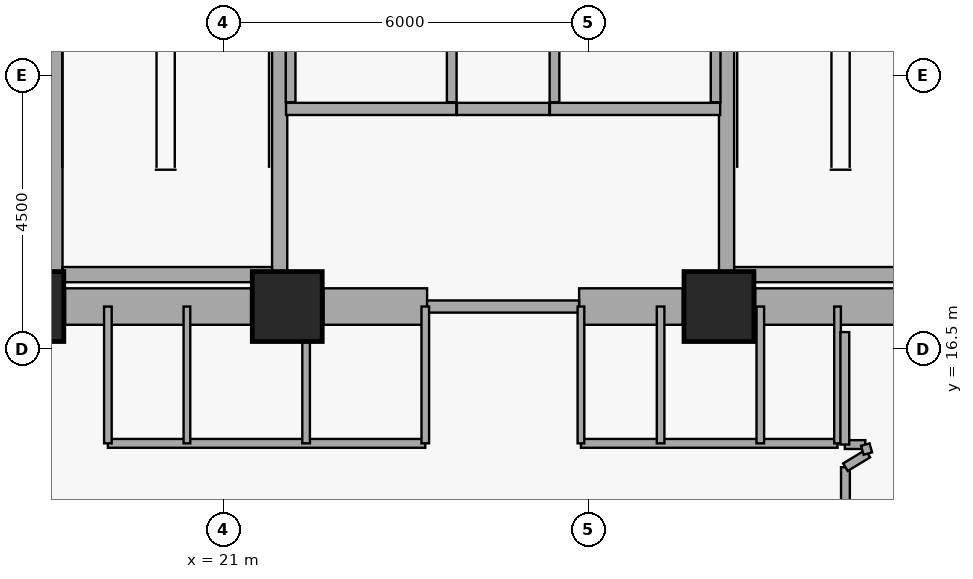
"""IFC4 building model, lengths in metres.
Left out: names, types, materials, properties, quantities, classifications, styles, units other than length and angle.
Written with IfcOpenShell. Run it as: python <this file> out.ifc"""

import sys

from ifc_helpers import new_model, si_unit, direction, frame, frame_2d, origin, origin_2d, place, context, subcontext, project, spatial, rectangle, extrude, element, fill, save


model = new_model("IFC4")
c1 = context("Model", 3, precision=1e-05, world=origin(), true_north=direction((0.0, 1.0)))
c2 = subcontext(c1, "Body", "Model", "MODEL_VIEW")
j1 = project(units=[si_unit("LENGTHUNIT", "METRE"), si_unit("PLANEANGLEUNIT", "RADIAN")], contexts=[c1])
p1 = place(None, origin())
s1 = spatial("IfcSite", under=j1, at=p1, CompositionType="ELEMENT")
p2 = place(p1, origin())
s2 = spatial("IfcBuilding", under=s1, at=p2, CompositionType="ELEMENT")
p3 = place(p2, frame((0.0, 0.0, 68.52)))
s3 = spatial("IfcBuildingStorey", under=s2, at=p3, CompositionType="ELEMENT", Elevation=68.52)
for number, where, z_axis, x_axis in (
    (1, (17.8, 17.2, 0.0), (0.0, 0.0, 1.0), (1.0, 0.0, 0.0)),
    (2, (22.05, 17.2, 0.0), (0.0, 0.0, 1.0), (1.0, 0.0, 0.0)),
    (3, (29.15, 17.2, 0.0), (0.0, 0.0, 1.0), (1.0, 0.0, 0.0)),
):
    element("IfcColumn", number, at=place(p3, frame(where, z_axis=z_axis, x_axis=x_axis)), inside=s3, PredefinedType="COLUMN", context=c2, shape_type="SweptSolid", body=[
        extrude(rectangle(XDim=1.15, YDim=1.15, at=origin_2d()), origin(), (0.0, 0.0, 1.0), 3.72),
    ])
p4 = place(p3, frame((18.395, 17.2, 0.0), z_axis=(0.0, 0.0, 1.0), x_axis=(1.0, 0.0, 0.0)))
e4 = element("IfcWall", 4, at=p4, inside=s3, PredefinedType="SHEAR", context=c2, shape_type="SweptSolid", body=[
    extrude(rectangle(XDim=3.06, YDim=0.6, at=frame_2d((1.53, 0.0))), origin(), (0.0, 0.0, 1.0), 3.47),
])
p5 = place(p3, frame((22.645, 17.2, 0.0), z_axis=(0.0, 0.0, 1.0), x_axis=(1.0, 0.0, 0.0)))
e5 = element("IfcWall", 5, at=p5, inside=s3, PredefinedType="SHEAR", context=c2, shape_type="SweptSolid", body=[
    extrude(rectangle(XDim=1.705, YDim=0.6, at=frame_2d((0.853, 0.0))), origin(), (0.0, 0.0, 1.0), 3.47),
])
p6 = place(p3, frame((26.85, 17.2, 0.0), z_axis=(0.0, 0.0, 1.0), x_axis=(1.0, 0.0, 0.0)))
e6 = element("IfcWall", 6, at=p6, inside=s3, PredefinedType="SHEAR", context=c2, shape_type="SweptSolid", body=[
    extrude(rectangle(XDim=1.705, YDim=0.6, at=frame_2d((0.853, 0.0))), origin(), (0.0, 0.0, 1.0), 3.47),
])
p7 = place(p3, frame((29.745, 17.2, 0.0), z_axis=(0.0, 0.0, 1.0), x_axis=(1.0, 0.0, 0.0)))
e7 = element("IfcWall", 7, at=p7, inside=s3, PredefinedType="SHEAR", context=c2, shape_type="SweptSolid", body=[
    extrude(rectangle(XDim=3.06, YDim=0.6, at=frame_2d((1.53, 0.0))), origin(), (0.0, 0.0, 1.0), 3.47),
])
p8 = place(p3, frame((18.229, 17.6, 0.0), z_axis=(0.0, 0.0, 1.0), x_axis=(0.0, 1.0, 0.0)))
e8 = element("IfcWall", 8, at=p8, inside=s3, PredefinedType="SHEAR", context=c2, shape_type="SweptSolid", body=[
    extrude(rectangle(XDim=8.8, YDim=0.25, at=frame_2d((4.4, 0.0))), origin(), (0.0, 0.0, 1.0), 3.47),
])
p9 = place(p3, frame((21.925, 17.6, 0.0), z_axis=(0.0, 0.0, 1.0), x_axis=(0.0, 1.0, 0.0)))
e9 = element("IfcWall", 9, at=p9, inside=s3, PredefinedType="SHEAR", context=c2, shape_type="SweptSolid", body=[
    extrude(rectangle(XDim=8.8, YDim=0.25, at=frame_2d((4.4, 0.0))), origin(), (0.0, 0.0, 1.0), 3.47),
])
p10 = place(p9, frame((0.35, 0.0, 0.0)))
e10 = element("IfcOpeningElement", 10, at=p10, cuts=e9, PredefinedType="OPENING", context=c2, shape_type="SweptSolid", body=[
    extrude(rectangle(XDim=1.05, YDim=2.08, at=frame_2d((0.525, 1.04))), frame((0.0, 0.135, 0.0), z_axis=(0.0, -1.0, 0.0), x_axis=(1.0, 0.0, 0.0)), (0.0, 0.0, 1.0), 0.27),
])
p11 = place(p3, frame((18.354, 17.725, 0.0), z_axis=(0.0, 0.0, 1.0), x_axis=(1.0, 0.0, 0.0)))
e11 = element("IfcWall", 11, at=p11, inside=s3, PredefinedType="SHEAR", context=c2, shape_type="SweptSolid", body=[
    extrude(rectangle(XDim=3.446, YDim=0.25, at=frame_2d((1.723, 0.0))), origin(), (0.0, 0.0, 1.0), 3.47),
])
p12 = place(p3, frame((29.275, 17.6, 0.0), z_axis=(0.0, 0.0, 1.0), x_axis=(0.0, 1.0, 0.0)))
e12 = element("IfcWall", 12, at=p12, inside=s3, PredefinedType="SHEAR", context=c2, shape_type="SweptSolid", body=[
    extrude(rectangle(XDim=8.8, YDim=0.25, at=frame_2d((4.4, 0.0))), origin(), (0.0, 0.0, 1.0), 3.47),
])
p13 = place(p12, frame((0.35, 0.0, 0.0)))
e13 = element("IfcOpeningElement", 13, at=p13, cuts=e12, PredefinedType="OPENING", context=c2, shape_type="SweptSolid", body=[
    extrude(rectangle(XDim=1.05, YDim=2.08, at=frame_2d((0.525, 1.04))), frame((0.0, 0.135, 0.0), z_axis=(0.0, -1.0, 0.0), x_axis=(1.0, 0.0, 0.0)), (0.0, 0.0, 1.0), 0.27),
])
p14 = place(p3, frame((29.4, 17.725, 0.0), z_axis=(0.0, 0.0, 1.0), x_axis=(1.0, 0.0, 0.0)))
e14 = element("IfcWall", 14, at=p14, inside=s3, PredefinedType="SHEAR", context=c2, shape_type="SweptSolid", body=[
    extrude(rectangle(XDim=3.446, YDim=0.25, at=frame_2d((1.723, 0.0))), origin(), (0.0, 0.0, 1.0), 3.47),
])
p15 = place(p3, frame((24.35, 17.2, 0.0), z_axis=(0.0, 0.0, 1.0), x_axis=(1.0, 0.0, 0.0)))
e15 = element("IfcWall", 15, at=p15, inside=s3, PredefinedType="PARTITIONING", context=c2, shape_type="SweptSolid", body=[
    extrude(rectangle(XDim=2.5, YDim=0.2, at=frame_2d((1.25, 0.0))), origin(), (0.0, 0.0, 1.0), 2.6),
])
p16 = place(p15, frame((0.68, 0.0, 0.0)))
e16 = element("IfcOpeningElement", 16, at=p16, cuts=e15, PredefinedType="OPENING", context=c2, shape_type="SweptSolid", body=[
    extrude(rectangle(XDim=1.15, YDim=2.08, at=frame_2d((0.575, 1.04))), frame((0.0, 0.11, 0.0), z_axis=(0.0, -1.0, 0.0), x_axis=(1.0, 0.0, 0.0)), (0.0, 0.0, 1.0), 0.22),
])
p17 = place(p3, frame((24.84, 20.45, 0.0), z_axis=(0.0, 0.0, 1.0), x_axis=(1.0, 0.0, 0.0)))
e17 = element("IfcWall", 17, at=p17, inside=s3, PredefinedType="PARTITIONING", context=c2, shape_type="SweptSolid", body=[
    extrude(rectangle(XDim=1.52, YDim=0.2, at=frame_2d((0.76, 0.0))), origin(), (0.0, 0.0, 1.0), 3.47),
])
p18 = place(p17, frame((0.27, 0.0, 0.0)))
e18 = element("IfcOpeningElement", 18, at=p18, cuts=e17, PredefinedType="OPENING", context=c2, shape_type="SweptSolid", body=[
    extrude(rectangle(XDim=0.98, YDim=2.06, at=frame_2d((0.49, 1.03))), frame((0.0, 0.11, 0.0), z_axis=(0.0, -1.0, 0.0), x_axis=(1.0, 0.0, 0.0)), (0.0, 0.0, 1.0), 0.22),
])
p19 = place(p3, frame((22.03, 20.45, 0.0), z_axis=(0.0, 0.0, 1.0), x_axis=(1.0, 0.0, 0.0)))
e19 = element("IfcWall", 19, at=p19, inside=s3, PredefinedType="PARTITIONING", context=c2, shape_type="SweptSolid", body=[
    extrude(rectangle(XDim=2.8, YDim=0.2, at=frame_2d((1.4, 0.0))), origin(), (0.0, 0.0, 1.0), 3.47),
])
p20 = place(p19, frame((0.78, 0.0, 0.0)))
e20 = element("IfcOpeningElement", 20, at=p20, cuts=e19, PredefinedType="OPENING", context=c2, shape_type="SweptSolid", body=[
    extrude(rectangle(XDim=1.1, YDim=2.08, at=frame_2d((0.55, 1.04))), frame((0.0, 0.11, 0.0), z_axis=(0.0, -1.0, 0.0), x_axis=(1.0, 0.0, 0.0)), (0.0, 0.0, 1.0), 0.22),
])
p21 = place(p3, frame((26.37, 20.45, 0.0), z_axis=(0.0, 0.0, 1.0), x_axis=(1.0, 0.0, 0.0)))
e21 = element("IfcWall", 21, at=p21, inside=s3, PredefinedType="PARTITIONING", context=c2, shape_type="SweptSolid", body=[
    extrude(rectangle(XDim=2.8, YDim=0.2, at=frame_2d((1.4, 0.0))), origin(), (0.0, 0.0, 1.0), 3.47),
])
p22 = place(p21, frame((0.78, 0.0, 0.0)))
e22 = element("IfcOpeningElement", 22, at=p22, cuts=e21, PredefinedType="OPENING", context=c2, shape_type="SweptSolid", body=[
    extrude(rectangle(XDim=1.1, YDim=2.08, at=frame_2d((0.55, 1.04))), frame((0.0, 0.11, 0.0), z_axis=(0.0, -1.0, 0.0), x_axis=(1.0, 0.0, 0.0)), (0.0, 0.0, 1.0), 0.22),
])
p23 = place(p3, frame((22.105, 20.56, 0.0), z_axis=(0.0, 0.0, 1.0), x_axis=(0.0, 1.0, 0.0)))
e23 = element("IfcWall", 23, at=p23, inside=s3, PredefinedType="PARTITIONING", context=c2, shape_type="SweptSolid", body=[
    extrude(rectangle(XDim=5.45, YDim=0.16, at=frame_2d((2.725, 0.0))), origin(), (0.0, 0.0, 1.0), 3.47),
])
p24 = place(p3, frame((24.755, 20.56, 0.0), z_axis=(0.0, 0.0, 1.0), x_axis=(0.0, 1.0, 0.0)))
e24 = element("IfcWall", 24, at=p24, inside=s3, PredefinedType="PARTITIONING", context=c2, shape_type="SweptSolid", body=[
    extrude(rectangle(XDim=1.71, YDim=0.16, at=frame_2d((0.855, 0.0))), origin(), (0.0, 0.0, 1.0), 3.47),
])
p25 = place(p3, frame((29.095, 20.56, 0.0), z_axis=(0.0, 0.0, 1.0), x_axis=(0.0, 1.0, 0.0)))
e25 = element("IfcWall", 25, at=p25, inside=s3, PredefinedType="PARTITIONING", context=c2, shape_type="SweptSolid", body=[
    extrude(rectangle(XDim=5.45, YDim=0.16, at=frame_2d((2.725, 0.0))), origin(), (0.0, 0.0, 1.0), 3.47),
])
p26 = place(p3, frame((26.445, 20.56, 0.0), z_axis=(0.0, 0.0, 1.0), x_axis=(0.0, 1.0, 0.0)))
e26 = element("IfcWall", 26, at=p26, inside=s3, PredefinedType="PARTITIONING", context=c2, shape_type="SweptSolid", body=[
    extrude(rectangle(XDim=1.71, YDim=0.16, at=frame_2d((0.855, 0.0))), origin(), (0.0, 0.0, 1.0), 3.47),
])
p27 = place(p3, frame((19.1, 14.95, 0.0), z_axis=(0.0, 0.0, 1.0), x_axis=(1.0, 0.0, 0.0)))
e27 = element("IfcWall", 27, at=p27, inside=s3, PredefinedType="PARTITIONING", context=c2, shape_type="SweptSolid", body=[
    extrude(rectangle(XDim=5.22, YDim=0.145, at=frame_2d((2.61, 0.0))), origin(), (0.0, 0.0, 1.0), 2.2),
])
p28 = place(p27, frame((0.2, 0.0, 0.0)))
e28 = element("IfcOpeningElement", 28, at=p28, cuts=e27, PredefinedType="OPENING", context=c2, shape_type="SweptSolid", body=[
    extrude(rectangle(XDim=0.9, YDim=2.02, at=frame_2d((0.45, 1.01))), frame((0.0, 0.083, 0.0), z_axis=(0.0, -1.0, 0.0), x_axis=(1.0, 0.0, 0.0)), (0.0, 0.0, 1.0), 0.165),
])
p29 = place(p27, frame((1.805, 0.0, 0.0)))
e29 = element("IfcOpeningElement", 29, at=p29, cuts=e27, PredefinedType="OPENING", context=c2, shape_type="SweptSolid", body=[
    extrude(rectangle(XDim=0.95, YDim=2.06, at=frame_2d((0.475, 1.03))), frame((0.0, 0.083, 0.0), z_axis=(0.0, -1.0, 0.0), x_axis=(1.0, 0.0, 0.0)), (0.0, 0.0, 1.0), 0.165),
])
p30 = place(p27, frame((3.765, 0.0, 0.0)))
e30 = element("IfcOpeningElement", 30, at=p30, cuts=e27, PredefinedType="OPENING", context=c2, shape_type="SweptSolid", body=[
    extrude(rectangle(XDim=0.95, YDim=2.06, at=frame_2d((0.475, 1.03))), frame((0.0, 0.083, 0.0), z_axis=(0.0, -1.0, 0.0), x_axis=(1.0, 0.0, 0.0)), (0.0, 0.0, 1.0), 0.165),
])
p31 = place(p3, frame((26.88, 14.95, 0.0), z_axis=(0.0, 0.0, 1.0), x_axis=(1.0, 0.0, 0.0)))
e31 = element("IfcWall", 31, at=p31, inside=s3, PredefinedType="PARTITIONING", context=c2, shape_type="SweptSolid", body=[
    extrude(rectangle(XDim=4.22, YDim=0.145, at=frame_2d((2.11, 0.0))), origin(), (0.0, 0.0, 1.0), 3.47),
])
p32 = place(p31, frame((0.2, 0.0, 0.0)))
e32 = element("IfcOpeningElement", 32, at=p32, cuts=e31, PredefinedType="OPENING", context=c2, shape_type="SweptSolid", body=[
    extrude(rectangle(XDim=0.9, YDim=2.02, at=frame_2d((0.45, 1.01))), frame((0.0, 0.083, 0.0), z_axis=(0.0, -1.0, 0.0), x_axis=(1.0, 0.0, 0.0)), (0.0, 0.0, 1.0), 0.165),
])
p33 = place(p31, frame((1.67, 0.0, 0.0)))
e33 = element("IfcOpeningElement", 33, at=p33, cuts=e31, PredefinedType="OPENING", context=c2, shape_type="SweptSolid", body=[
    extrude(rectangle(XDim=0.92, YDim=2.05, at=frame_2d((0.46, 1.025))), frame((0.0, 0.083, 0.0), z_axis=(0.0, -1.0, 0.0), x_axis=(1.0, 0.0, 0.0)), (0.0, 0.0, 1.0), 0.165),
])
p34 = place(p31, frame((3.14, 0.0, 0.0)))
e34 = element("IfcOpeningElement", 34, at=p34, cuts=e31, PredefinedType="OPENING", context=c2, shape_type="SweptSolid", body=[
    extrude(rectangle(XDim=0.9, YDim=2.02, at=frame_2d((0.45, 1.01))), frame((0.0, 0.083, 0.0), z_axis=(0.0, -1.0, 0.0), x_axis=(1.0, 0.0, 0.0)), (0.0, 0.0, 1.0), 0.165),
])
p35 = place(p3, frame((19.1, 14.95, 0.0), z_axis=(0.0, 0.0, 1.0), x_axis=(0.0, 1.0, 0.0)))
e35 = element("IfcWall", 35, at=p35, inside=s3, PredefinedType="PARTITIONING", context=c2, shape_type="SweptSolid", body=[
    extrude(rectangle(XDim=2.25, YDim=0.125, at=frame_2d((1.125, 0.0))), origin(), (0.0, 0.0, 1.0), 2.6),
])
p36 = place(p3, frame((20.4, 14.95, 0.0), z_axis=(0.0, 0.0, 1.0), x_axis=(0.0, 1.0, 0.0)))
e36 = element("IfcWall", 36, at=p36, inside=s3, PredefinedType="PARTITIONING", context=c2, shape_type="SweptSolid", body=[
    extrude(rectangle(XDim=2.25, YDim=0.11, at=frame_2d((1.125, 0.0))), origin(), (0.0, 0.0, 1.0), 2.6),
])
p37 = place(p3, frame((22.36, 14.95, 0.0), z_axis=(0.0, 0.0, 1.0), x_axis=(0.0, 1.0, 0.0)))
e37 = element("IfcWall", 37, at=p37, inside=s3, PredefinedType="PARTITIONING", context=c2, shape_type="SweptSolid", body=[
    extrude(rectangle(XDim=2.25, YDim=0.125, at=frame_2d((1.125, 0.0))), origin(), (0.0, 0.0, 1.0), 2.2),
])
p38 = place(p3, frame((24.32, 14.95, 0.0), z_axis=(0.0, 0.0, 1.0), x_axis=(0.0, 1.0, 0.0)))
e38 = element("IfcWall", 38, at=p38, inside=s3, PredefinedType="PARTITIONING", context=c2, shape_type="SweptSolid", body=[
    extrude(rectangle(XDim=2.25, YDim=0.125, at=frame_2d((1.125, 0.0))), origin(), (0.0, 0.0, 1.0), 2.6),
])
p39 = place(p3, frame((26.88, 14.95, 0.0), z_axis=(0.0, 0.0, 1.0), x_axis=(0.0, 1.0, 0.0)))
e39 = element("IfcWall", 39, at=p39, inside=s3, PredefinedType="PARTITIONING", context=c2, shape_type="SweptSolid", body=[
    extrude(rectangle(XDim=2.25, YDim=0.11, at=frame_2d((1.125, 0.0))), origin(), (0.0, 0.0, 1.0), 2.6),
])
for number, where, z_axis, x_axis in (
    (40, (28.19, 14.95, 0.0), (0.0, 0.0, 1.0), (0.0, 1.0, 0.0)),
    (41, (29.83, 14.95, 0.0), (0.0, 0.0, 1.0), (0.0, 1.0, 0.0)),
):
    element("IfcWall", number, at=place(p3, frame(where, z_axis=z_axis, x_axis=x_axis)), inside=s3, PredefinedType="PARTITIONING", context=c2, shape_type="SweptSolid", body=[
        extrude(rectangle(XDim=2.25, YDim=0.125, at=frame_2d((1.125, 0.0))), origin(), (0.0, 0.0, 1.0), 2.6),
    ])
p40 = place(p3, frame((31.1, 14.95, 0.0), z_axis=(0.0, 0.0, 1.0), x_axis=(0.0, 1.0, 0.0)))
e42 = element("IfcWall", 42, at=p40, inside=s3, PredefinedType="PARTITIONING", context=c2, shape_type="SweptSolid", body=[
    extrude(rectangle(XDim=2.25, YDim=0.11, at=frame_2d((1.125, 0.0))), origin(), (0.0, 0.0, 1.0), 2.6),
])
p41 = place(p3, frame((31.23, 13.29, 0.0), z_axis=(0.0, 0.0, 1.0), x_axis=(0.0, 1.0, 0.0)))
e43 = element("IfcWall", 43, at=p41, inside=s3, PredefinedType="PARTITIONING", context=c2, shape_type="SweptSolid", body=[
    extrude(rectangle(XDim=1.268, YDim=0.145, at=frame_2d((0.634, 0.0))), origin(), (0.0, 0.0, 1.0), 2.85),
])
p42 = place(p3, frame((31.23, 14.558, 0.0), z_axis=(0.0, 0.0, 1.0), x_axis=(0.854931196424, 0.518741408971, 0.0)))
e44 = element("IfcWall", 44, at=p42, inside=s3, PredefinedType="PARTITIONING", context=c2, shape_type="SweptSolid", body=[
    extrude(rectangle(XDim=0.431, YDim=0.145, at=frame_2d((0.215, 0.0))), origin(), (0.0, 0.0, 1.0), 3.47),
])
p43 = place(p3, frame((31.557, 14.93, 0.0), z_axis=(0.0, 0.0, 1.0), x_axis=(-1.0, 0.0, 0.0)))
e45 = element("IfcWall", 45, at=p43, inside=s3, PredefinedType="PARTITIONING", context=c2, shape_type="SweptSolid", body=[
    extrude(rectangle(XDim=0.337, YDim=0.145, at=frame_2d((0.168, 0.0))), origin(), (0.0, 0.0, 1.0), 3.47),
])
p44 = place(p3, frame((31.22, 14.93, 0.0), z_axis=(0.0, 0.0, 1.0), x_axis=(0.0, 1.0, 0.0)))
e46 = element("IfcWall", 46, at=p44, inside=s3, PredefinedType="PARTITIONING", context=c2, shape_type="SweptSolid", body=[
    extrude(rectangle(XDim=1.85, YDim=0.145, at=frame_2d((0.925, 0.0))), origin(), (0.0, 0.0, 1.0), 2.6),
])
p45 = place(p3, frame((31.598, 14.781, 0.0), z_axis=(0.0, 0.0, 1.0), x_axis=(-0.269277388617, 0.963062660464, 0.0)))
e47 = element("IfcWall", 47, at=p45, inside=s3, PredefinedType="PARTITIONING", context=c2, shape_type="SweptSolid", body=[
    extrude(rectangle(XDim=0.154, YDim=0.145, at=frame_2d((0.077, 0.0))), origin(), (0.0, 0.0, 1.0), 3.47),
])
p46 = place(p10, origin())
e48 = element("IfcDoor", 48, at=p46, inside=s3, OperationType="SINGLE_SWING_LEFT", PredefinedType="DOOR", context=c2, shape_type="SweptSolid", body=[
    extrude(rectangle(XDim=1.05, YDim=2.08, at=frame_2d((0.525, 1.04))), frame((0.0, 0.025, 0.0), z_axis=(0.0, -1.0, 0.0), x_axis=(1.0, 0.0, 0.0)), (0.0, 0.0, 1.0), 0.05),
])
fill(e10, e48)
p47 = place(p13, origin())
e49 = element("IfcDoor", 49, at=p47, inside=s3, OperationType="SINGLE_SWING_RIGHT", PredefinedType="DOOR", context=c2, shape_type="SweptSolid", body=[
    extrude(rectangle(XDim=1.05, YDim=2.08, at=frame_2d((0.525, 1.04))), frame((0.0, 0.025, 0.0), z_axis=(0.0, -1.0, 0.0), x_axis=(1.0, 0.0, 0.0)), (0.0, 0.0, 1.0), 0.05),
])
fill(e13, e49)
p48 = place(p16, origin())
e50 = element("IfcDoor", 50, at=p48, inside=s3, OperationType="SINGLE_SWING_LEFT", PredefinedType="DOOR", context=c2, shape_type="SweptSolid", body=[
    extrude(rectangle(XDim=1.15, YDim=2.08, at=frame_2d((0.575, 1.04))), frame((0.0, 0.025, 0.0), z_axis=(0.0, -1.0, 0.0), x_axis=(1.0, 0.0, 0.0)), (0.0, 0.0, 1.0), 0.05),
])
fill(e16, e50)
p49 = place(p18, origin())
e51 = element("IfcDoor", 51, at=p49, inside=s3, OperationType="SINGLE_SWING_RIGHT", PredefinedType="DOOR", context=c2, shape_type="SweptSolid", body=[
    extrude(rectangle(XDim=0.98, YDim=2.06, at=frame_2d((0.49, 1.03))), frame((0.0, 0.025, 0.0), z_axis=(0.0, -1.0, 0.0), x_axis=(1.0, 0.0, 0.0)), (0.0, 0.0, 1.0), 0.05),
])
fill(e18, e51)
p50 = place(p20, origin())
e52 = element("IfcDoor", 52, at=p50, inside=s3, OperationType="DOUBLE_DOOR_SLIDING", PredefinedType="DOOR", context=c2, shape_type="SweptSolid", body=[
    extrude(rectangle(XDim=1.1, YDim=2.08, at=frame_2d((0.55, 1.04))), frame((0.0, 0.025, 0.0), z_axis=(0.0, -1.0, 0.0), x_axis=(1.0, 0.0, 0.0)), (0.0, 0.0, 1.0), 0.05),
])
fill(e20, e52)
p51 = place(p22, origin())
e53 = element("IfcDoor", 53, at=p51, inside=s3, OperationType="DOUBLE_DOOR_SLIDING", PredefinedType="DOOR", context=c2, shape_type="SweptSolid", body=[
    extrude(rectangle(XDim=1.1, YDim=2.08, at=frame_2d((0.55, 1.04))), frame((0.0, 0.025, 0.0), z_axis=(0.0, -1.0, 0.0), x_axis=(1.0, 0.0, 0.0)), (0.0, 0.0, 1.0), 0.05),
])
fill(e22, e53)
p52 = place(p28, origin())
e54 = element("IfcDoor", 54, at=p52, inside=s3, OperationType="SINGLE_SWING_LEFT", PredefinedType="DOOR", context=c2, shape_type="SweptSolid", body=[
    extrude(rectangle(XDim=0.9, YDim=2.02, at=frame_2d((0.45, 1.01))), frame((0.0, 0.025, 0.0), z_axis=(0.0, -1.0, 0.0), x_axis=(1.0, 0.0, 0.0)), (0.0, 0.0, 1.0), 0.05),
])
fill(e28, e54)
p53 = place(p29, origin())
e55 = element("IfcDoor", 55, at=p53, inside=s3, OperationType="SINGLE_SWING_RIGHT", PredefinedType="DOOR", context=c2, shape_type="SweptSolid", body=[
    extrude(rectangle(XDim=0.95, YDim=2.06, at=frame_2d((0.475, 1.03))), frame((0.0, 0.025, 0.0), z_axis=(0.0, -1.0, 0.0), x_axis=(1.0, 0.0, 0.0)), (0.0, 0.0, 1.0), 0.05),
])
fill(e29, e55)
p54 = place(p30, origin())
e56 = element("IfcDoor", 56, at=p54, inside=s3, OperationType="SINGLE_SWING_LEFT", PredefinedType="DOOR", context=c2, shape_type="SweptSolid", body=[
    extrude(rectangle(XDim=0.95, YDim=2.06, at=frame_2d((0.475, 1.03))), frame((0.0, 0.025, 0.0), z_axis=(0.0, -1.0, 0.0), x_axis=(1.0, 0.0, 0.0)), (0.0, 0.0, 1.0), 0.05),
])
fill(e30, e56)
p55 = place(p32, origin())
e57 = element("IfcDoor", 57, at=p55, inside=s3, OperationType="SINGLE_SWING_RIGHT", PredefinedType="DOOR", context=c2, shape_type="SweptSolid", body=[
    extrude(rectangle(XDim=0.9, YDim=2.02, at=frame_2d((0.45, 1.01))), frame((0.0, 0.025, 0.0), z_axis=(0.0, -1.0, 0.0), x_axis=(1.0, 0.0, 0.0)), (0.0, 0.0, 1.0), 0.05),
])
fill(e32, e57)
p56 = place(p33, origin())
e58 = element("IfcDoor", 58, at=p56, inside=s3, OperationType="SINGLE_SWING_LEFT", PredefinedType="DOOR", context=c2, shape_type="SweptSolid", body=[
    extrude(rectangle(XDim=0.92, YDim=2.05, at=frame_2d((0.46, 1.025))), frame((0.0, 0.025, 0.0), z_axis=(0.0, -1.0, 0.0), x_axis=(1.0, 0.0, 0.0)), (0.0, 0.0, 1.0), 0.05),
])
fill(e33, e58)
p57 = place(p34, origin())
e59 = element("IfcDoor", 59, at=p57, inside=s3, OperationType="SINGLE_SWING_RIGHT", PredefinedType="DOOR", context=c2, shape_type="SweptSolid", body=[
    extrude(rectangle(XDim=0.9, YDim=2.02, at=frame_2d((0.45, 1.01))), frame((0.0, 0.025, 0.0), z_axis=(0.0, -1.0, 0.0), x_axis=(1.0, 0.0, 0.0)), (0.0, 0.0, 1.0), 0.05),
])
fill(e34, e59)
save(model, sys.argv[1])
